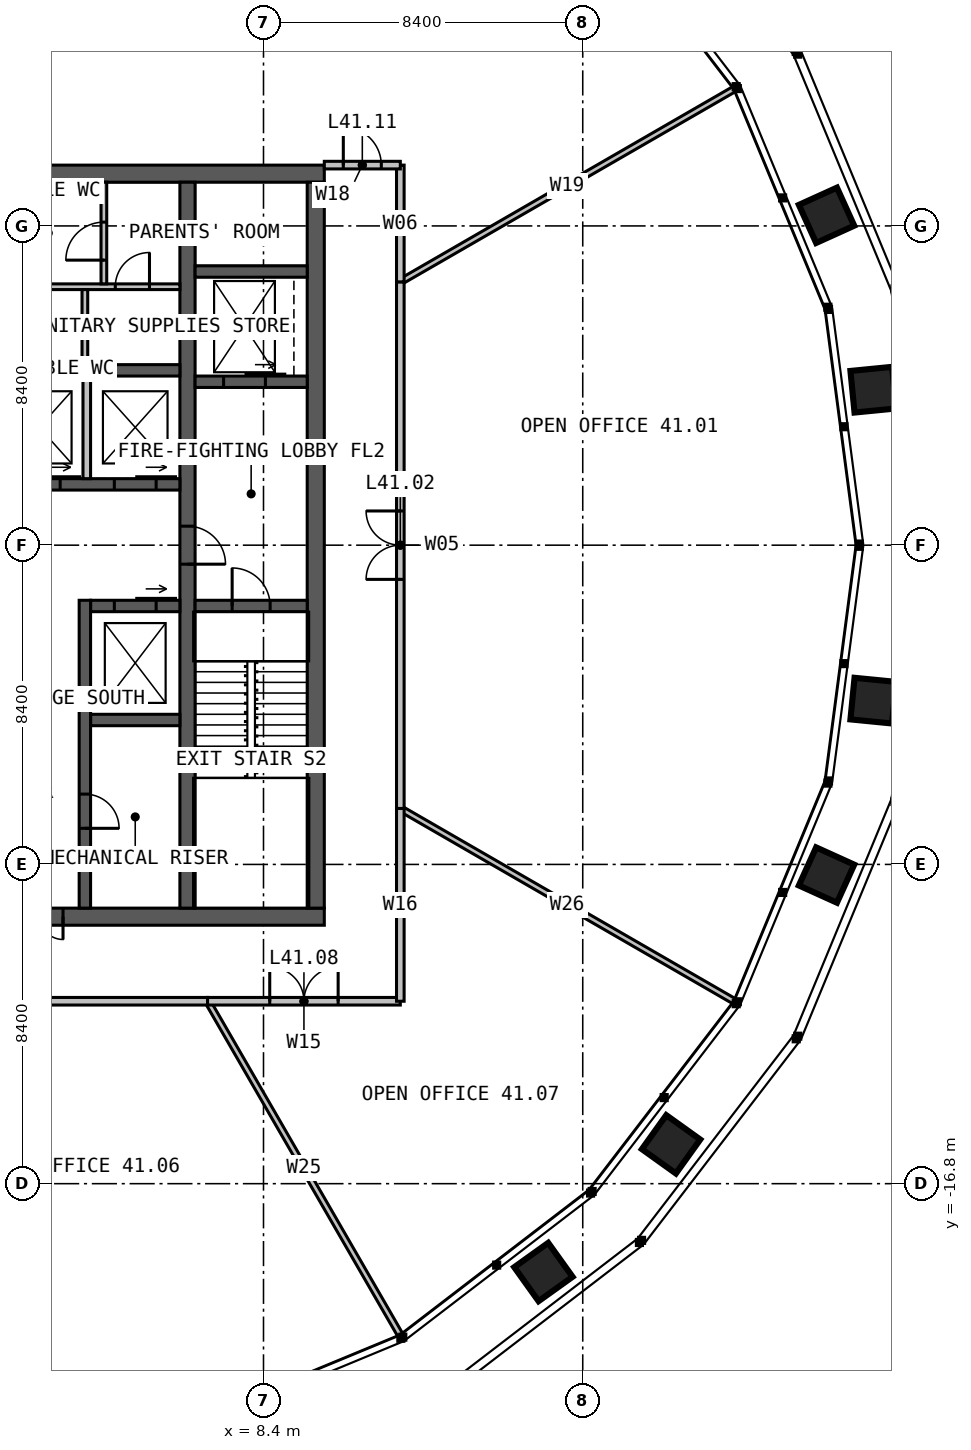
"""IFC4 building model, lengths in metres.
Left out: names, types, materials, properties, quantities, classifications, styles, units other than length and angle.
Written with IfcOpenShell. Run it as: python <this file> out.ifc"""

import sys

from ifc_helpers import new_model, si_unit, direction, frame, frame_2d, origin, place, context, subcontext, project, spatial, rectangle, extrude, element, fill, save


model = new_model("IFC4")
c1 = context("Model", 3, precision=1e-05, world=origin(), true_north=direction((0.0, 1.0)))
c2 = subcontext(c1, "Body", "Model", "MODEL_VIEW")
j1 = project(units=[si_unit("LENGTHUNIT", "METRE"), si_unit("PLANEANGLEUNIT", "RADIAN")], contexts=[c1])
p1 = place(None, origin())
s1 = spatial("IfcSite", under=j1, at=p1, CompositionType="ELEMENT")
p2 = place(p1, origin())
s2 = spatial("IfcBuilding", under=s1, at=p2, CompositionType="ELEMENT")
p3 = place(p2, frame((0.0, 0.0, 171.0)))
s3 = spatial("IfcBuildingStorey", under=s2, at=p3, CompositionType="ELEMENT", Elevation=171.0)
p4 = place(p3, frame((-10.0, 9.775, 0.0), z_axis=(0.0, 0.0, 1.0), x_axis=(1.0, 0.0, 0.0)))
e1 = element("IfcWall", 1, at=p4, inside=s3, PredefinedType="SOLIDWALL", context=c2, shape_type="SweptSolid", body=[
    extrude(rectangle(XDim=20.0, YDim=0.45, at=frame_2d((10.0, 0.0))), origin(), (0.0, 0.0, 1.0), 4.0),
])
p5 = place(p4, frame((9.4, 0.0, 0.0)))
e2 = element("IfcOpeningElement", 2, at=p5, cuts=e1, PredefinedType="OPENING", context=c2, shape_type="SweptSolid", body=[
    extrude(rectangle(XDim=1.2, YDim=2.2, at=frame_2d((0.6, 1.1))), frame((0.0, 0.235, 0.0), z_axis=(0.0, -1.0, 0.0), x_axis=(1.0, 0.0, 0.0)), (0.0, 0.0, 1.0), 0.47),
])
p6 = place(p3, frame((10.0, -9.775, 0.0), z_axis=(0.0, 0.0, 1.0), x_axis=(-1.0, 0.0, 0.0)))
e3 = element("IfcWall", 3, at=p6, inside=s3, PredefinedType="SOLIDWALL", context=c2, shape_type="SweptSolid", body=[
    extrude(rectangle(XDim=20.0, YDim=0.45, at=frame_2d((10.0, 0.0))), origin(), (0.0, 0.0, 1.0), 4.0),
])
p7 = place(p6, frame((6.875, 0.0, 0.0)))
e4 = element("IfcOpeningElement", 4, at=p7, cuts=e3, PredefinedType="OPENING", context=c2, shape_type="SweptSolid", body=[
    extrude(rectangle(XDim=1.2, YDim=2.2, at=frame_2d((0.6, 1.1))), frame((0.0, 0.235, 0.0), z_axis=(0.0, -1.0, 0.0), x_axis=(1.0, 0.0, 0.0)), (0.0, 0.0, 1.0), 0.47),
])
p8 = place(p3, frame((9.775, -9.55, 0.0), z_axis=(0.0, 0.0, 1.0), x_axis=(0.0, 1.0, 0.0)))
e5 = element("IfcWall", 5, at=p8, inside=s3, PredefinedType="SOLIDWALL", context=c2, shape_type="SweptSolid", body=[
    extrude(rectangle(XDim=19.1, YDim=0.45, at=frame_2d((9.55, 0.0))), origin(), (0.0, 0.0, 1.0), 4.0),
])
p9 = place(p3, frame((6.4, 9.55, 0.0), z_axis=(0.0, 0.0, 1.0), x_axis=(0.0, -1.0, 0.0)))
e6 = element("IfcWall", 6, at=p9, inside=s3, PredefinedType="SOLIDWALL", context=c2, shape_type="SweptSolid", body=[
    extrude(rectangle(XDim=19.1, YDim=0.4, at=frame_2d((9.55, 0.0))), origin(), (0.0, 0.0, 1.0), 4.0),
])
p10 = place(p9, frame((9.05, 0.0, 0.0)))
e7 = element("IfcOpeningElement", 7, at=p10, cuts=e6, PredefinedType="OPENING", context=c2, shape_type="SweptSolid", body=[
    extrude(rectangle(XDim=1.0, YDim=2.2, at=frame_2d((0.5, 1.1))), frame((0.0, 0.21, 0.0), z_axis=(0.0, -1.0, 0.0), x_axis=(1.0, 0.0, 0.0)), (0.0, 0.0, 1.0), 0.42),
])
p11 = place(p3, frame((1.35, 1.6, 0.0), z_axis=(0.0, 0.0, 1.0), x_axis=(1.0, 0.0, 0.0)))
e8 = element("IfcWall", 8, at=p11, inside=s3, PredefinedType="SOLIDWALL", context=c2, shape_type="SweptSolid", body=[
    extrude(rectangle(XDim=4.85, YDim=0.3, at=frame_2d((2.425, 0.0))), origin(), (0.0, 0.0, 1.0), 4.0),
])
p12 = place(p11, frame((0.6, 0.0, 0.0)))
e9 = element("IfcOpeningElement", 9, at=p12, cuts=e8, PredefinedType="OPENING", context=c2, shape_type="SweptSolid", body=[
    extrude(rectangle(XDim=1.1, YDim=2.2, at=frame_2d((0.55, 1.1))), frame((0.0, 0.16, 0.0), z_axis=(0.0, -1.0, 0.0), x_axis=(1.0, 0.0, 0.0)), (0.0, 0.0, 1.0), 0.32),
])
p13 = place(p11, frame((3.125, 0.0, 0.0)))
e10 = element("IfcOpeningElement", 10, at=p13, cuts=e8, PredefinedType="OPENING", context=c2, shape_type="SweptSolid", body=[
    extrude(rectangle(XDim=1.1, YDim=2.2, at=frame_2d((0.55, 1.1))), frame((0.0, 0.16, 0.0), z_axis=(0.0, -1.0, 0.0), x_axis=(1.0, 0.0, 0.0)), (0.0, 0.0, 1.0), 0.32),
])
p14 = place(p3, frame((1.35, 4.6, 0.0), z_axis=(0.0, 0.0, 1.0), x_axis=(1.0, 0.0, 0.0)))
e11 = element("IfcWall", 11, at=p14, inside=s3, PredefinedType="SOLIDWALL", context=c2, shape_type="SweptSolid", body=[
    extrude(rectangle(XDim=4.85, YDim=0.3, at=frame_2d((2.425, 0.0))), origin(), (0.0, 0.0, 1.0), 4.0),
])
p15 = place(p3, frame((3.85, -1.6, 0.0), z_axis=(0.0, 0.0, 1.0), x_axis=(1.0, 0.0, 0.0)))
e12 = element("IfcWall", 12, at=p15, inside=s3, PredefinedType="SOLIDWALL", context=c2, shape_type="SweptSolid", body=[
    extrude(rectangle(XDim=2.35, YDim=0.3, at=frame_2d((1.175, 0.0))), origin(), (0.0, 0.0, 1.0), 4.0),
])
p16 = place(p15, frame((0.625, 0.0, 0.0)))
e13 = element("IfcOpeningElement", 13, at=p16, cuts=e12, PredefinedType="OPENING", context=c2, shape_type="SweptSolid", body=[
    extrude(rectangle(XDim=1.1, YDim=2.2, at=frame_2d((0.55, 1.1))), frame((0.0, 0.16, 0.0), z_axis=(0.0, -1.0, 0.0), x_axis=(1.0, 0.0, 0.0)), (0.0, 0.0, 1.0), 0.32),
])
p17 = place(p3, frame((3.85, -4.6, 0.0), z_axis=(0.0, 0.0, 1.0), x_axis=(1.0, 0.0, 0.0)))
e14 = element("IfcWall", 14, at=p17, inside=s3, PredefinedType="SOLIDWALL", context=c2, shape_type="SweptSolid", body=[
    extrude(rectangle(XDim=2.35, YDim=0.3, at=frame_2d((1.175, 0.0))), origin(), (0.0, 0.0, 1.0), 4.0),
])
p18 = place(p3, frame((3.7, -1.45, 0.0), z_axis=(0.0, 0.0, 1.0), x_axis=(0.0, -1.0, 0.0)))
e15 = element("IfcWall", 15, at=p18, inside=s3, PredefinedType="SOLIDWALL", context=c2, shape_type="SweptSolid", body=[
    extrude(rectangle(XDim=8.1, YDim=0.3, at=frame_2d((4.05, 0.0))), origin(), (0.0, 0.0, 1.0), 4.0),
])
p19 = place(p18, frame((5.1, 0.0, 0.0)))
e16 = element("IfcOpeningElement", 16, at=p19, cuts=e15, PredefinedType="OPENING", context=c2, shape_type="SweptSolid", body=[
    extrude(rectangle(XDim=0.9, YDim=2.2, at=frame_2d((0.45, 1.1))), frame((0.0, 0.16, 0.0), z_axis=(0.0, -1.0, 0.0), x_axis=(1.0, 0.0, 0.0)), (0.0, 0.0, 1.0), 0.32),
])
p20 = place(p3, frame((6.6, -1.6, 0.0), z_axis=(0.0, 0.0, 1.0), x_axis=(1.0, 0.0, 0.0)))
e17 = element("IfcWall", 17, at=p20, inside=s3, PredefinedType="SOLIDWALL", context=c2, shape_type="SweptSolid", body=[
    extrude(rectangle(XDim=2.95, YDim=0.3, at=frame_2d((1.475, 0.0))), origin(), (0.0, 0.0, 1.0), 4.0),
])
p21 = place(p20, frame((0.975, 0.0, 0.0)))
e18 = element("IfcOpeningElement", 18, at=p21, cuts=e17, PredefinedType="OPENING", context=c2, shape_type="SweptSolid", body=[
    extrude(rectangle(XDim=1.0, YDim=2.2, at=frame_2d((0.5, 1.1))), frame((0.0, 0.16, 0.0), z_axis=(0.0, -1.0, 0.0), x_axis=(1.0, 0.0, 0.0)), (0.0, 0.0, 1.0), 0.32),
])
p22 = place(p3, frame((6.6, 4.3, 0.0), z_axis=(0.0, 0.0, 1.0), x_axis=(1.0, 0.0, 0.0)))
e19 = element("IfcWall", 19, at=p22, inside=s3, PredefinedType="SOLIDWALL", context=c2, shape_type="SweptSolid", body=[
    extrude(rectangle(XDim=2.95, YDim=0.3, at=frame_2d((1.475, 0.0))), origin(), (0.0, 0.0, 1.0), 4.0),
])
p23 = place(p22, frame((0.75, 0.0, 0.0)))
e20 = element("IfcOpeningElement", 20, at=p23, cuts=e19, PredefinedType="OPENING", context=c2, shape_type="SweptSolid", body=[
    extrude(rectangle(XDim=1.1, YDim=2.2, at=frame_2d((0.55, 1.1))), frame((0.0, 0.16, 0.0), z_axis=(0.0, -1.0, 0.0), x_axis=(1.0, 0.0, 0.0)), (0.0, 0.0, 1.0), 0.32),
])
p24 = place(p3, frame((6.6, 7.2, 0.0), z_axis=(0.0, 0.0, 1.0), x_axis=(1.0, 0.0, 0.0)))
e21 = element("IfcWall", 21, at=p24, inside=s3, PredefinedType="SOLIDWALL", context=c2, shape_type="SweptSolid", body=[
    extrude(rectangle(XDim=2.95, YDim=0.3, at=frame_2d((1.475, 0.0))), origin(), (0.0, 0.0, 1.0), 4.0),
])
p25 = place(p3, frame((3.75, 1.75, 0.0), z_axis=(0.0, 0.0, 1.0), x_axis=(0.0, 1.0, 0.0)))
e22 = element("IfcWall", 22, at=p25, inside=s3, PredefinedType="SOLIDWALL", context=c2, shape_type="SweptSolid", body=[
    extrude(rectangle(XDim=2.7, YDim=0.2, at=frame_2d((1.35, 0.0))), origin(), (0.0, 0.0, 1.0), 3.75),
])
p26 = place(p3, frame((1.35, 6.8, 0.0), z_axis=(0.0, 0.0, 1.0), x_axis=(1.0, 0.0, 0.0)))
e23 = element("IfcWall", 23, at=p26, inside=s3, PredefinedType="PARTITIONING", context=c2, shape_type="SweptSolid", body=[
    extrude(rectangle(XDim=4.85, YDim=0.15, at=frame_2d((2.425, 0.0))), origin(), (0.0, 0.0, 1.0), 3.75),
])
p27 = place(p26, frame((3.15, 0.0, 0.0)))
e24 = element("IfcOpeningElement", 24, at=p27, cuts=e23, PredefinedType="OPENING", context=c2, shape_type="SweptSolid", body=[
    extrude(rectangle(XDim=0.9, YDim=2.2, at=frame_2d((0.45, 1.1))), frame((0.0, 0.085, 0.0), z_axis=(0.0, -1.0, 0.0), x_axis=(1.0, 0.0, 0.0)), (0.0, 0.0, 1.0), 0.17),
])
p28 = place(p3, frame((3.7, 4.75, 0.0), z_axis=(0.0, 0.0, 1.0), x_axis=(0.0, 1.0, 0.0)))
e25 = element("IfcWall", 25, at=p28, inside=s3, PredefinedType="PARTITIONING", context=c2, shape_type="SweptSolid", body=[
    extrude(rectangle(XDim=1.975, YDim=0.15, at=frame_2d((0.988, 0.0))), origin(), (0.0, 0.0, 1.0), 3.75),
])
p29 = place(p3, frame((4.2, 6.875, 0.0), z_axis=(0.0, 0.0, 1.0), x_axis=(0.0, 1.0, 0.0)))
e26 = element("IfcWall", 26, at=p29, inside=s3, PredefinedType="PARTITIONING", context=c2, shape_type="SweptSolid", body=[
    extrude(rectangle(XDim=2.675, YDim=0.15, at=frame_2d((1.337, 0.0))), origin(), (0.0, 0.0, 1.0), 3.75),
])
p30 = place(p29, frame((0.625, 0.0, 0.0)))
e27 = element("IfcOpeningElement", 27, at=p30, cuts=e26, PredefinedType="OPENING", context=c2, shape_type="SweptSolid", body=[
    extrude(rectangle(XDim=1.0, YDim=2.2, at=frame_2d((0.5, 1.1))), frame((0.0, 0.085, 0.0), z_axis=(0.0, -1.0, 0.0), x_axis=(1.0, 0.0, 0.0)), (0.0, 0.0, 1.0), 0.17),
])
for number, where, z_axis, x_axis in (
    (28, (12.0, -6.928, 0.0), (0.0, 0.0, 1.0), (0.866, -0.5, 0.0)),
    (29, (12.0, 6.928, 0.0), (0.0, 0.0, 1.0), (0.866, 0.5, 0.0)),
    (30, (6.928, -12.0, 0.0), (0.0, 0.0, 1.0), (0.5, -0.866, 0.0)),
):
    element("IfcWall", number, at=place(p3, frame(where, z_axis=z_axis, x_axis=x_axis)), inside=s3, PredefinedType="PARTITIONING", context=c2, shape_type="SweptSolid", body=[
        extrude(rectangle(XDim=10.136, YDim=0.15, at=frame_2d((5.068, 0.0))), origin(), (0.0, 0.0, 1.0), 2.79),
    ])
p31 = place(p3, frame((12.0, -6.928, 0.0), z_axis=(0.0, 0.0, 1.0), x_axis=(0.0, 1.0, 0.0)))
e31 = element("IfcWall", 31, at=p31, inside=s3, PredefinedType="PARTITIONING", context=c2, shape_type="SweptSolid", body=[
    extrude(rectangle(XDim=13.856, YDim=0.2, at=frame_2d((6.928, 0.0))), origin(), (0.0, 0.0, 1.0), 3.8),
])
p32 = place(p31, frame((6.028, 0.0, 0.0)))
e32 = element("IfcOpeningElement", 32, at=p32, cuts=e31, PredefinedType="OPENING", context=c2, shape_type="SweptSolid", body=[
    extrude(rectangle(XDim=1.8, YDim=2.2, at=frame_2d((0.9, 1.1))), frame((0.0, 0.11, 0.0), z_axis=(0.0, -1.0, 0.0), x_axis=(1.0, 0.0, 0.0)), (0.0, 0.0, 1.0), 0.22),
])
p33 = place(p3, frame((12.0, 6.928, 0.0), z_axis=(0.0, 0.0, 1.0), x_axis=(0.0, 1.0, 0.0)))
e33 = element("IfcWall", 33, at=p33, inside=s3, PredefinedType="PARTITIONING", context=c2, shape_type="SweptSolid", body=[
    extrude(rectangle(XDim=3.072, YDim=0.2, at=frame_2d((1.536, 0.0))), origin(), (0.0, 0.0, 1.0), 3.8),
])
p34 = place(p3, frame((-3.215, -12.0, 0.0), z_axis=(0.0, 0.0, 1.0), x_axis=(1.0, 0.0, 0.0)))
e34 = element("IfcWall", 34, at=p34, inside=s3, PredefinedType="PARTITIONING", context=c2, shape_type="SweptSolid", body=[
    extrude(rectangle(XDim=10.144, YDim=0.2, at=frame_2d((5.072, 0.0))), origin(), (0.0, 0.0, 1.0), 3.8),
])
p35 = place(p34, frame((4.172, 0.0, 0.0)))
e35 = element("IfcOpeningElement", 35, at=p35, cuts=e34, PredefinedType="OPENING", context=c2, shape_type="SweptSolid", body=[
    extrude(rectangle(XDim=1.8, YDim=2.2, at=frame_2d((0.9, 1.1))), frame((0.0, 0.11, 0.0), z_axis=(0.0, -1.0, 0.0), x_axis=(1.0, 0.0, 0.0)), (0.0, 0.0, 1.0), 0.22),
])
p36 = place(p3, frame((6.928, -12.0, 0.0), z_axis=(0.0, 0.0, 1.0), x_axis=(1.0, 0.0, 0.0)))
e36 = element("IfcWall", 36, at=p36, inside=s3, PredefinedType="PARTITIONING", context=c2, shape_type="SweptSolid", body=[
    extrude(rectangle(XDim=5.072, YDim=0.2, at=frame_2d((2.536, 0.0))), origin(), (0.0, 0.0, 1.0), 3.8),
])
p37 = place(p36, frame((1.636, 0.0, 0.0)))
e37 = element("IfcOpeningElement", 37, at=p37, cuts=e36, PredefinedType="OPENING", context=c2, shape_type="SweptSolid", body=[
    extrude(rectangle(XDim=1.8, YDim=2.2, at=frame_2d((0.9, 1.1))), frame((0.0, 0.11, 0.0), z_axis=(0.0, -1.0, 0.0), x_axis=(1.0, 0.0, 0.0)), (0.0, 0.0, 1.0), 0.22),
])
p38 = place(p3, frame((12.0, -12.0, 0.0), z_axis=(0.0, 0.0, 1.0), x_axis=(0.0, 1.0, 0.0)))
e38 = element("IfcWall", 38, at=p38, inside=s3, PredefinedType="PARTITIONING", context=c2, shape_type="SweptSolid", body=[
    extrude(rectangle(XDim=5.072, YDim=0.2, at=frame_2d((2.536, 0.0))), origin(), (0.0, 0.0, 1.0), 3.8),
])
p39 = place(p3, frame((10.0, 10.0, 0.0), z_axis=(0.0, 0.0, 1.0), x_axis=(1.0, 0.0, 0.0)))
e39 = element("IfcWall", 39, at=p39, inside=s3, PredefinedType="PARTITIONING", context=c2, shape_type="SweptSolid", body=[
    extrude(rectangle(XDim=2.0, YDim=0.2, at=frame_2d((1.0, 0.0))), origin(), (0.0, 0.0, 1.0), 3.8),
])
p40 = place(p39, frame((0.5, 0.0, 0.0)))
e40 = element("IfcOpeningElement", 40, at=p40, cuts=e39, PredefinedType="OPENING", context=c2, shape_type="SweptSolid", body=[
    extrude(rectangle(XDim=1.0, YDim=2.2, at=frame_2d((0.5, 1.1))), frame((0.0, 0.11, 0.0), z_axis=(0.0, -1.0, 0.0), x_axis=(1.0, 0.0, 0.0)), (0.0, 0.0, 1.0), 0.22),
])
p41 = place(p7, origin())
e41 = element("IfcDoor", 41, at=p41, inside=s3, OperationType="DOUBLE_DOOR_SINGLE_SWING", PredefinedType="DOOR", context=c2, shape_type="SweptSolid", body=[
    extrude(rectangle(XDim=1.2, YDim=2.2, at=frame_2d((0.6, 1.1))), frame((0.0, 0.025, 0.0), z_axis=(0.0, -1.0, 0.0), x_axis=(1.0, 0.0, 0.0)), (0.0, 0.0, 1.0), 0.05),
])
fill(e4, e41)
p42 = place(p10, origin())
e42 = element("IfcDoor", 42, at=p42, inside=s3, OperationType="SINGLE_SWING_RIGHT", PredefinedType="DOOR", context=c2, shape_type="SweptSolid", body=[
    extrude(rectangle(XDim=1.0, YDim=2.2, at=frame_2d((0.5, 1.1))), frame((0.0, 0.025, 0.0), z_axis=(0.0, -1.0, 0.0), x_axis=(1.0, 0.0, 0.0)), (0.0, 0.0, 1.0), 0.05),
])
fill(e7, e42)
p43 = place(p21, origin())
e43 = element("IfcDoor", 43, at=p43, inside=s3, OperationType="SINGLE_SWING_LEFT", PredefinedType="DOOR", context=c2, shape_type="SweptSolid", body=[
    extrude(rectangle(XDim=1.0, YDim=2.2, at=frame_2d((0.5, 1.1))), frame((0.0, 0.025, 0.0), z_axis=(0.0, -1.0, 0.0), x_axis=(1.0, 0.0, 0.0)), (0.0, 0.0, 1.0), 0.05),
])
fill(e18, e43)
p44 = place(p19, origin())
e44 = element("IfcDoor", 44, at=p44, inside=s3, OperationType="SINGLE_SWING_RIGHT", PredefinedType="DOOR", context=c2, shape_type="SweptSolid", body=[
    extrude(rectangle(XDim=0.9, YDim=2.2, at=frame_2d((0.45, 1.1))), frame((0.0, 0.025, 0.0), z_axis=(0.0, -1.0, 0.0), x_axis=(1.0, 0.0, 0.0)), (0.0, 0.0, 1.0), 0.05),
])
fill(e16, e44)
p45 = place(p27, origin())
e45 = element("IfcDoor", 45, at=p45, inside=s3, OperationType="SINGLE_SWING_RIGHT", PredefinedType="DOOR", context=c2, shape_type="SweptSolid", body=[
    extrude(rectangle(XDim=0.9, YDim=2.2, at=frame_2d((0.45, 1.1))), frame((0.0, 0.025, 0.0), z_axis=(0.0, -1.0, 0.0), x_axis=(1.0, 0.0, 0.0)), (0.0, 0.0, 1.0), 0.05),
])
fill(e24, e45)
p46 = place(p30, origin())
e46 = element("IfcDoor", 46, at=p46, inside=s3, OperationType="SINGLE_SWING_LEFT", PredefinedType="DOOR", context=c2, shape_type="SweptSolid", body=[
    extrude(rectangle(XDim=1.0, YDim=2.2, at=frame_2d((0.5, 1.1))), frame((0.0, 0.025, 0.0), z_axis=(0.0, -1.0, 0.0), x_axis=(1.0, 0.0, 0.0)), (0.0, 0.0, 1.0), 0.05),
])
fill(e27, e46)
p47 = place(p12, origin())
e47 = element("IfcDoor", 47, at=p47, inside=s3, OperationType="SLIDING_TO_LEFT", PredefinedType="DOOR", context=c2, shape_type="SweptSolid", body=[
    extrude(rectangle(XDim=1.1, YDim=2.2, at=frame_2d((0.55, 1.1))), frame((0.0, 0.025, 0.0), z_axis=(0.0, -1.0, 0.0), x_axis=(1.0, 0.0, 0.0)), (0.0, 0.0, 1.0), 0.05),
])
fill(e9, e47)
p48 = place(p13, origin())
e48 = element("IfcDoor", 48, at=p48, inside=s3, OperationType="SLIDING_TO_LEFT", PredefinedType="DOOR", context=c2, shape_type="SweptSolid", body=[
    extrude(rectangle(XDim=1.1, YDim=2.2, at=frame_2d((0.55, 1.1))), frame((0.0, 0.025, 0.0), z_axis=(0.0, -1.0, 0.0), x_axis=(1.0, 0.0, 0.0)), (0.0, 0.0, 1.0), 0.05),
])
fill(e10, e48)
p49 = place(p16, origin())
e49 = element("IfcDoor", 49, at=p49, inside=s3, OperationType="SLIDING_TO_LEFT", PredefinedType="DOOR", context=c2, shape_type="SweptSolid", body=[
    extrude(rectangle(XDim=1.1, YDim=2.2, at=frame_2d((0.55, 1.1))), frame((0.0, 0.025, 0.0), z_axis=(0.0, -1.0, 0.0), x_axis=(1.0, 0.0, 0.0)), (0.0, 0.0, 1.0), 0.05),
])
fill(e13, e49)
p50 = place(p23, origin())
e50 = element("IfcDoor", 50, at=p50, inside=s3, OperationType="SLIDING_TO_LEFT", PredefinedType="DOOR", context=c2, shape_type="SweptSolid", body=[
    extrude(rectangle(XDim=1.1, YDim=2.2, at=frame_2d((0.55, 1.1))), frame((0.0, 0.025, 0.0), z_axis=(0.0, -1.0, 0.0), x_axis=(1.0, 0.0, 0.0)), (0.0, 0.0, 1.0), 0.05),
])
fill(e20, e50)
p51 = place(p32, origin())
e51 = element("IfcDoor", 51, at=p51, inside=s3, OperationType="DOUBLE_DOOR_SINGLE_SWING", PredefinedType="DOOR", context=c2, shape_type="SweptSolid", body=[
    extrude(rectangle(XDim=1.8, YDim=2.2, at=frame_2d((0.9, 1.1))), frame((0.0, 0.025, 0.0), z_axis=(0.0, -1.0, 0.0), x_axis=(1.0, 0.0, 0.0)), (0.0, 0.0, 1.0), 0.05),
])
fill(e32, e51)
p52 = place(p37, origin())
e52 = element("IfcDoor", 52, at=p52, inside=s3, OperationType="DOUBLE_DOOR_SINGLE_SWING", PredefinedType="DOOR", context=c2, shape_type="SweptSolid", body=[
    extrude(rectangle(XDim=1.8, YDim=2.2, at=frame_2d((0.9, 1.1))), frame((0.0, 0.025, 0.0), z_axis=(0.0, -1.0, 0.0), x_axis=(1.0, 0.0, 0.0)), (0.0, 0.0, 1.0), 0.05),
])
fill(e37, e52)
p53 = place(p40, origin())
e53 = element("IfcDoor", 53, at=p53, inside=s3, OperationType="SINGLE_SWING_LEFT", PredefinedType="DOOR", context=c2, shape_type="SweptSolid", body=[
    extrude(rectangle(XDim=1.0, YDim=2.2, at=frame_2d((0.5, 1.1))), frame((0.0, 0.025, 0.0), z_axis=(0.0, -1.0, 0.0), x_axis=(1.0, 0.0, 0.0)), (0.0, 0.0, 1.0), 0.05),
])
fill(e40, e53)
save(model, sys.argv[1])
